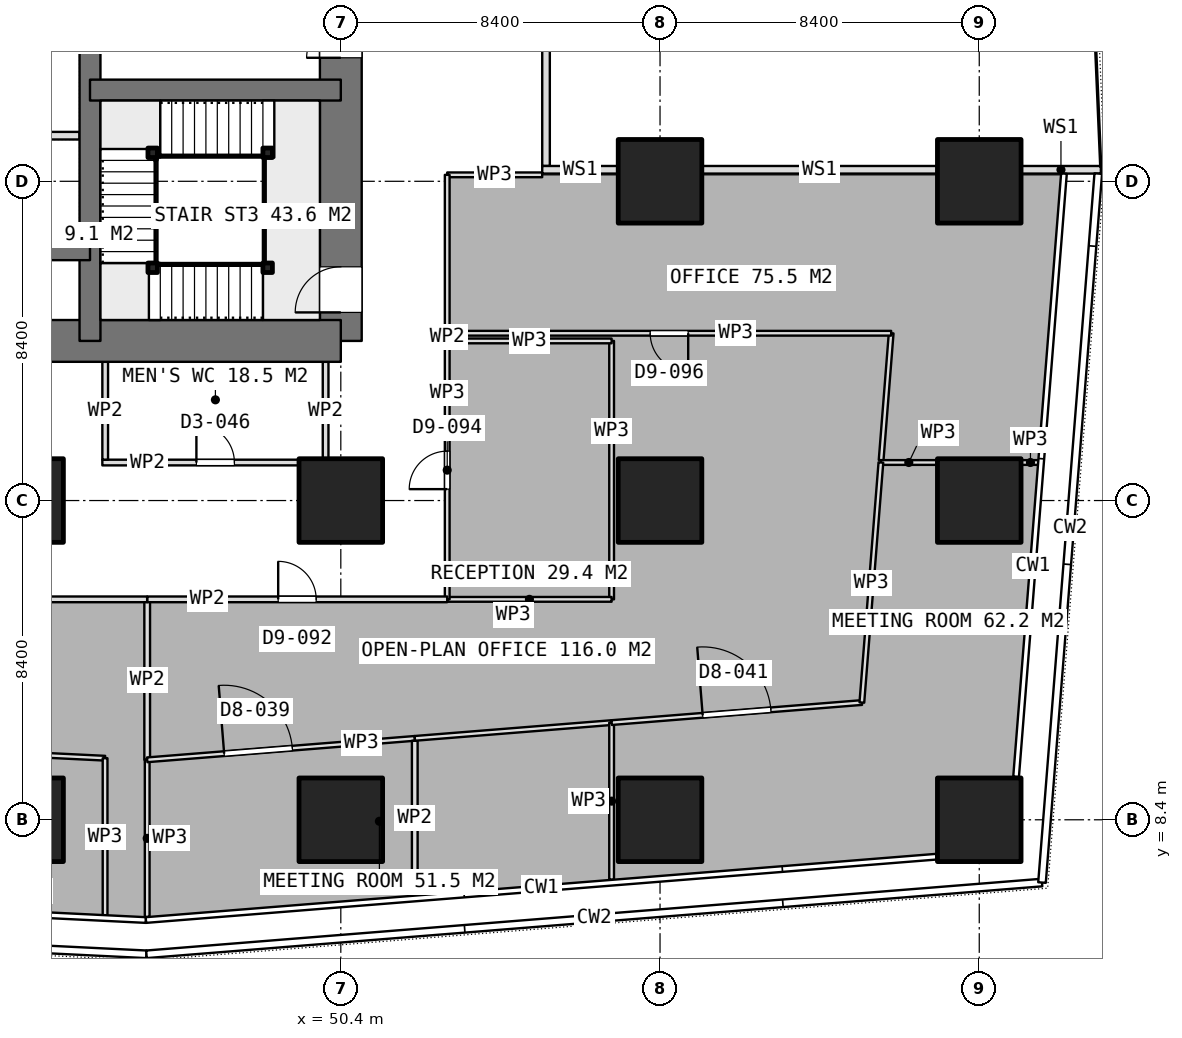
"""IFC4 building model, lengths in metres.
Left out: names, types, materials, properties, quantities, classifications, styles, units other than length and angle.
Written with IfcOpenShell. Run it as: python <this file> out.ifc"""

import sys

from ifc_helpers import new_model, si_unit, direction, frame, frame_2d, origin, origin_2d, place, context, subcontext, project, spatial, rectangle, extrude, element, fill, save


model = new_model("IFC4")
c1 = context("Model", 3, precision=1e-05, world=origin(), true_north=direction((0.0, 1.0)))
c2 = subcontext(c1, "Body", "Model", "MODEL_VIEW")
j1 = project(units=[si_unit("LENGTHUNIT", "METRE"), si_unit("PLANEANGLEUNIT", "RADIAN")], contexts=[c1])
p1 = place(None, origin())
s1 = spatial("IfcSite", under=j1, at=p1, CompositionType="ELEMENT")
p2 = place(p1, origin())
s2 = spatial("IfcBuilding", under=s1, at=p2, CompositionType="ELEMENT")
p3 = place(p2, frame((0.0, 0.0, 40.4)))
s3 = spatial("IfcBuildingStorey", under=s2, at=p3, CompositionType="ELEMENT", Elevation=40.4)
p4 = place(p3, frame((40.0, 21.0, 0.0), z_axis=(0.0, 0.0, 1.0), x_axis=(1.0, 0.0, 0.0)))
e1 = element("IfcWall", 1, at=p4, inside=s3, PredefinedType="SHEAR", context=c2, shape_type="SweptSolid", body=[
    extrude(rectangle(XDim=10.4, YDim=1.1, at=frame_2d((5.2, 0.0))), origin(), (0.0, 0.0, 1.0), 3.75),
])
p5 = place(p3, frame((50.4, 21.0, 0.0), z_axis=(0.0, 0.0, 1.0), x_axis=(0.0, 1.0, 0.0)))
e2 = element("IfcWall", 2, at=p5, inside=s3, PredefinedType="SHEAR", context=c2, shape_type="SweptSolid", body=[
    extrude(rectangle(XDim=25.2, YDim=1.1, at=frame_2d((12.6, 0.0))), origin(), (0.0, 0.0, 1.0), 3.75),
])
p6 = place(p5, frame((16.2, 0.0, 0.0)))
e3 = element("IfcOpeningElement", 3, at=p6, cuts=e2, PredefinedType="OPENING", context=c2, shape_type="SweptSolid", body=[
    extrude(rectangle(XDim=1.2, YDim=2.1, at=frame_2d((0.6, 1.05))), frame((0.0, 0.56, 0.0), z_axis=(0.0, -1.0, 0.0), x_axis=(1.0, 0.0, 0.0)), (0.0, 0.0, 1.0), 1.12),
])
p7 = place(p5, frame((10.05, 0.0, 0.0)))
e4 = element("IfcOpeningElement", 4, at=p7, cuts=e2, PredefinedType="OPENING", context=c2, shape_type="SweptSolid", body=[
    extrude(rectangle(XDim=0.9, YDim=2.1, at=frame_2d((0.45, 1.05))), frame((0.0, 0.56, 0.0), z_axis=(0.0, -1.0, 0.0), x_axis=(1.0, 0.0, 0.0)), (0.0, 0.0, 1.0), 1.12),
])
p8 = place(p5, frame((7.45, 0.0, 0.0)))
e5 = element("IfcOpeningElement", 5, at=p8, cuts=e2, PredefinedType="OPENING", context=c2, shape_type="SweptSolid", body=[
    extrude(rectangle(XDim=0.9, YDim=2.1, at=frame_2d((0.45, 1.05))), frame((0.0, 0.56, 0.0), z_axis=(0.0, -1.0, 0.0), x_axis=(1.0, 0.0, 0.0)), (0.0, 0.0, 1.0), 1.12),
])
p9 = place(p5, frame((0.75, 0.0, 0.0)))
e6 = element("IfcOpeningElement", 6, at=p9, cuts=e2, PredefinedType="OPENING", context=c2, shape_type="SweptSolid", body=[
    extrude(rectangle(XDim=1.2, YDim=2.1, at=frame_2d((0.6, 1.05))), frame((0.0, 0.56, 0.0), z_axis=(0.0, -1.0, 0.0), x_axis=(1.0, 0.0, 0.0)), (0.0, 0.0, 1.0), 1.12),
])
p10 = place(p3, frame((43.8, 21.0, 0.0), z_axis=(0.0, 0.0, 1.0), x_axis=(0.0, 1.0, 0.0)))
e7 = element("IfcWall", 7, at=p10, inside=s3, PredefinedType="SHEAR", context=c2, shape_type="SweptSolid", body=[
    extrude(rectangle(XDim=25.2, YDim=0.55, at=frame_2d((12.6, 0.0))), origin(), (0.0, 0.0, 1.0), 3.75),
])
p11 = place(p3, frame((40.0, 23.4, 0.0), z_axis=(0.0, 0.0, 1.0), x_axis=(1.0, 0.0, 0.0)))
e8 = element("IfcWall", 8, at=p11, inside=s3, PredefinedType="SHEAR", context=c2, shape_type="SweptSolid", body=[
    extrude(rectangle(XDim=3.8, YDim=0.55, at=frame_2d((1.9, 0.0))), origin(), (0.0, 0.0, 1.0), 3.75),
])
p12 = place(p3, frame((43.8, 27.6, 0.0), z_axis=(0.0, 0.0, 1.0), x_axis=(1.0, 0.0, 0.0)))
e9 = element("IfcWall", 9, at=p12, inside=s3, PredefinedType="SHEAR", context=c2, shape_type="SweptSolid", body=[
    extrude(rectangle(XDim=6.6, YDim=0.55, at=frame_2d((3.3, 0.0))), origin(), (0.0, 0.0, 1.0), 3.75),
])
for number, where, z_axis, x_axis in (
    (10, (42.0, 8.4, 0.0), (0.0, 0.0, 1.0), (1.0, 0.0, 0.0)),
    (11, (42.0, 16.8, 0.0), (0.0, 0.0, 1.0), (1.0, 0.0, 0.0)),
    (12, (50.4, 8.4, 0.0), (0.0, 0.0, 1.0), (1.0, 0.0, 0.0)),
    (13, (50.4, 16.8, 0.0), (0.0, 0.0, 1.0), (1.0, 0.0, 0.0)),
    (14, (58.8, 8.4, 0.0), (0.0, 0.0, 1.0), (1.0, 0.0, 0.0)),
    (15, (58.8, 16.8, 0.0), (0.0, 0.0, 1.0), (1.0, 0.0, 0.0)),
    (16, (58.8, 25.2, 0.0), (0.0, 0.0, 1.0), (1.0, 0.0, 0.0)),
    (17, (67.2, 8.4, 0.0), (0.0, 0.0, 1.0), (1.0, 0.0, 0.0)),
    (18, (67.2, 16.8, 0.0), (0.0, 0.0, 1.0), (1.0, 0.0, 0.0)),
    (19, (67.2, 25.2, 0.0), (0.0, 0.0, 1.0), (1.0, 0.0, 0.0)),
):
    element("IfcColumn", number, at=place(p3, frame(where, z_axis=z_axis, x_axis=x_axis)), inside=s3, PredefinedType="COLUMN", context=c2, shape_type="SweptSolid", body=[
        extrude(rectangle(XDim=2.2, YDim=2.2, at=origin_2d()), origin(), (0.0, 0.0, 1.0), 3.75),
    ])
p13 = place(p3, frame((40.275, 26.4, 0.0), z_axis=(0.0, 0.0, 1.0), x_axis=(1.0, 0.0, 0.0)))
e20 = element("IfcWall", 20, at=p13, inside=s3, PredefinedType="PARTITIONING", context=c2, shape_type="SweptSolid", body=[
    extrude(rectangle(XDim=3.25, YDim=0.2, at=frame_2d((1.625, 0.0))), origin(), (0.0, 0.0, 1.0), 3.5),
])
p14 = place(p3, frame((44.125, 17.8, 0.0), z_axis=(0.0, 0.0, 1.0), x_axis=(1.0, 0.0, 0.0)))
e21 = element("IfcWall", 21, at=p14, inside=s3, PredefinedType="PARTITIONING", context=c2, shape_type="SweptSolid", body=[
    extrude(rectangle(XDim=5.95, YDim=0.15, at=frame_2d((2.975, 0.0))), origin(), (0.0, 0.0, 1.0), 3.5),
])
p15 = place(p14, frame((2.475, 0.0, 0.0)))
e22 = element("IfcOpeningElement", 22, at=p15, cuts=e21, PredefinedType="OPENING", context=c2, shape_type="SweptSolid", body=[
    extrude(rectangle(XDim=1.0, YDim=2.1, at=frame_2d((0.5, 1.05))), frame((0.0, 0.085, 0.0), z_axis=(0.0, -1.0, 0.0), x_axis=(1.0, 0.0, 0.0)), (0.0, 0.0, 1.0), 0.17),
])
for number, where, z_axis, x_axis in (
    (23, (44.2, 17.875, 0.0), (0.0, 0.0, 1.0), (0.0, 1.0, 0.0)),
    (24, (50.0, 17.875, 0.0), (0.0, 0.0, 1.0), (0.0, 1.0, 0.0)),
):
    element("IfcWall", number, at=place(p3, frame(where, z_axis=z_axis, x_axis=x_axis)), inside=s3, PredefinedType="PARTITIONING", context=c2, shape_type="SweptSolid", body=[
        extrude(rectangle(XDim=2.575, YDim=0.15, at=frame_2d((1.288, 0.0))), origin(), (0.0, 0.0, 1.0), 3.5),
    ])
p16 = place(p3, frame((45.305, 5.845, 0.0), z_axis=(0.0, 0.0, 1.0), x_axis=(0.0, 1.0, 0.0)))
e25 = element("IfcWall", 25, at=p16, inside=s3, PredefinedType="PARTITIONING", context=c2, shape_type="SweptSolid", body=[
    extrude(rectangle(XDim=4.133, YDim=0.125, at=frame_2d((2.066, 0.0))), origin(), (0.0, 0.0, 1.0), 3.5),
])
p17 = place(p3, frame((45.305, 9.978, 0.0), z_axis=(0.0, 0.0, 1.0), x_axis=(0.996808462073, 0.079830382311, 0.0)))
e26 = element("IfcWall", 26, at=p17, inside=s3, PredefinedType="PARTITIONING", context=c2, shape_type="SweptSolid", body=[
    extrude(rectangle(XDim=7.064, YDim=0.125, at=frame_2d((3.532, 0.0))), origin(), (0.0, 0.0, 1.0), 3.5),
])
p18 = place(p17, frame((2.032, 0.0, 0.0)))
e27 = element("IfcOpeningElement", 27, at=p18, cuts=e26, PredefinedType="OPENING", context=c2, shape_type="SweptSolid", body=[
    extrude(rectangle(XDim=1.8, YDim=2.1, at=frame_2d((0.9, 1.05))), frame((0.0, 0.073, 0.0), z_axis=(0.0, -1.0, 0.0), x_axis=(1.0, 0.0, 0.0)), (0.0, 0.0, 1.0), 0.145),
])
p19 = place(p3, frame((52.347, 10.542, 0.0), z_axis=(0.0, 0.0, 1.0), x_axis=(0.996804212425, 0.079883428139, 0.0)))
e28 = element("IfcWall", 28, at=p19, inside=s3, PredefinedType="PARTITIONING", context=c2, shape_type="SweptSolid", body=[
    extrude(rectangle(XDim=5.196, YDim=0.125, at=frame_2d((2.598, 0.0))), origin(), (0.0, 0.0, 1.0), 3.5),
])
p20 = place(p3, frame((57.526, 10.957, 0.0), z_axis=(0.0, 0.0, 1.0), x_axis=(0.0, -1.0, 0.0)))
e29 = element("IfcWall", 29, at=p20, inside=s3, PredefinedType="PARTITIONING", context=c2, shape_type="SweptSolid", body=[
    extrude(rectangle(XDim=4.133, YDim=0.125, at=frame_2d((2.066, 0.0))), origin(), (0.0, 0.0, 1.0), 3.5),
])
p21 = place(p3, frame((64.612, 17.801, 0.0), z_axis=(0.0, 0.0, 1.0), x_axis=(1.0, 0.0, 0.0)))
e30 = element("IfcWall", 30, at=p21, inside=s3, PredefinedType="PARTITIONING", context=c2, shape_type="SweptSolid", body=[
    extrude(rectangle(XDim=1.468, YDim=0.125, at=frame_2d((0.734, 0.0))), origin(), (0.0, 0.0, 1.0), 3.5),
])
p22 = place(p3, frame((68.32, 17.801, 0.0), z_axis=(0.0, 0.0, 1.0), x_axis=(1.0, 0.0, 0.0)))
e31 = element("IfcWall", 31, at=p22, inside=s3, PredefinedType="PARTITIONING", context=c2, shape_type="SweptSolid", body=[
    extrude(rectangle(XDim=0.455, YDim=0.125, at=frame_2d((0.228, 0.0))), origin(), (0.0, 0.0, 1.0), 3.5),
])
p23 = place(p3, frame((57.527, 10.957, 0.0), z_axis=(0.0, 0.0, 1.0), x_axis=(0.996798921347, 0.079949424016, 0.0)))
e32 = element("IfcWall", 32, at=p23, inside=s3, PredefinedType="PARTITIONING", context=c2, shape_type="SweptSolid", body=[
    extrude(rectangle(XDim=6.605, YDim=0.125, at=frame_2d((3.303, 0.0))), origin(), (0.0, 0.0, 1.0), 3.5),
])
p24 = place(p23, frame((2.403, 0.0, 0.0)))
e33 = element("IfcOpeningElement", 33, at=p24, cuts=e32, PredefinedType="OPENING", context=c2, shape_type="SweptSolid", body=[
    extrude(rectangle(XDim=1.8, YDim=2.1, at=frame_2d((0.9, 1.05))), frame((0.0, 0.073, 0.0), z_axis=(0.0, -1.0, 0.0), x_axis=(1.0, 0.0, 0.0)), (0.0, 0.0, 1.0), 0.145),
])
p25 = place(p3, frame((64.111, 11.485, 0.0), z_axis=(0.0, 0.0, 1.0), x_axis=(0.079071322326, 0.996868961291, 0.0)))
e34 = element("IfcWall", 34, at=p25, inside=s3, PredefinedType="PARTITIONING", context=c2, shape_type="SweptSolid", body=[
    extrude(rectangle(XDim=6.336, YDim=0.125, at=frame_2d((3.168, 0.0))), origin(), (0.0, 0.0, 1.0), 3.5),
])
p26 = place(p3, frame((53.2, 21.202, 0.0), z_axis=(0.0, 0.0, 1.0), x_axis=(0.0, 1.0, 0.0)))
e35 = element("IfcWall", 35, at=p26, inside=s3, PredefinedType="PARTITIONING", context=c2, shape_type="SweptSolid", body=[
    extrude(rectangle(XDim=4.168, YDim=0.125, at=frame_2d((2.084, 0.0))), origin(), (0.0, 0.0, 1.0), 3.5),
])
p27 = place(p3, frame((53.2, 25.37, 0.0), z_axis=(0.0, 0.0, 1.0), x_axis=(1.0, 0.0, 0.0)))
e36 = element("IfcWall", 36, at=p27, inside=s3, PredefinedType="PARTITIONING", context=c2, shape_type="SweptSolid", body=[
    extrude(rectangle(XDim=2.499, YDim=0.125, at=frame_2d((1.25, 0.0))), origin(), (0.0, 0.0, 1.0), 3.5),
])
p28 = place(p3, frame((64.618, 17.863, 0.0), z_axis=(0.0, 0.0, 1.0), x_axis=(0.078870243594, 0.996884890384, 0.0)))
e37 = element("IfcWall", 37, at=p28, inside=s3, PredefinedType="PARTITIONING", context=c2, shape_type="SweptSolid", body=[
    extrude(rectangle(XDim=3.349, YDim=0.125, at=frame_2d((1.675, 0.0))), origin(), (0.0, 0.0, 1.0), 3.5),
])
p29 = place(p3, frame((64.882, 21.202, 0.0), z_axis=(0.0, 0.0, 1.0), x_axis=(-1.0, 0.0, 0.0)))
e38 = element("IfcWall", 38, at=p29, inside=s3, PredefinedType="PARTITIONING", context=c2, shape_type="SweptSolid", body=[
    extrude(rectangle(XDim=11.682, YDim=0.125, at=frame_2d((5.841, 0.0))), origin(), (0.0, 0.0, 1.0), 3.5),
])
p30 = place(p29, frame((5.341, 0.0, 0.0)))
e39 = element("IfcOpeningElement", 39, at=p30, cuts=e38, PredefinedType="OPENING", context=c2, shape_type="SweptSolid", body=[
    extrude(rectangle(XDim=1.0, YDim=2.1, at=frame_2d((0.5, 1.05))), frame((0.0, 0.073, 0.0), z_axis=(0.0, -1.0, 0.0), x_axis=(1.0, 0.0, 0.0)), (0.0, 0.0, 1.0), 0.145),
])
p31 = place(p3, frame((57.526, 21.0, 0.0), z_axis=(0.0, 0.0, 1.0), x_axis=(0.0, -1.0, 0.0)))
e40 = element("IfcWall", 40, at=p31, inside=s3, PredefinedType="PARTITIONING", context=c2, shape_type="SweptSolid", body=[
    extrude(rectangle(XDim=6.8, YDim=0.125, at=frame_2d((3.4, 0.0))), origin(), (0.0, 0.0, 1.0), 3.5),
])
p32 = place(p3, frame((57.526, 14.2, 0.0), z_axis=(0.0, 0.0, 1.0), x_axis=(-1.0, 0.0, 0.0)))
e41 = element("IfcWall", 41, at=p32, inside=s3, PredefinedType="PARTITIONING", context=c2, shape_type="SweptSolid", body=[
    extrude(rectangle(XDim=4.326, YDim=0.125, at=frame_2d((2.163, 0.0))), origin(), (0.0, 0.0, 1.0), 3.5),
])
p33 = place(p3, frame((53.2, 14.2, 0.0), z_axis=(0.0, 0.0, 1.0), x_axis=(0.0, 1.0, 0.0)))
e42 = element("IfcWall", 42, at=p33, inside=s3, PredefinedType="PARTITIONING", context=c2, shape_type="SweptSolid", body=[
    extrude(rectangle(XDim=6.8, YDim=0.125, at=frame_2d((3.4, 0.0))), origin(), (0.0, 0.0, 1.0), 3.5),
])
p34 = place(p33, frame((2.9, 0.0, 0.0)))
e43 = element("IfcOpeningElement", 43, at=p34, cuts=e42, PredefinedType="OPENING", context=c2, shape_type="SweptSolid", body=[
    extrude(rectangle(XDim=1.0, YDim=2.1, at=frame_2d((0.5, 1.05))), frame((0.0, 0.073, 0.0), z_axis=(0.0, -1.0, 0.0), x_axis=(1.0, 0.0, 0.0)), (0.0, 0.0, 1.0), 0.145),
])
p35 = place(p3, frame((53.2, 21.0, 0.0), z_axis=(0.0, 0.0, 1.0), x_axis=(1.0, 0.0, 0.0)))
e44 = element("IfcWall", 44, at=p35, inside=s3, PredefinedType="PARTITIONING", context=c2, shape_type="SweptSolid", body=[
    extrude(rectangle(XDim=4.326, YDim=0.125, at=frame_2d((2.163, 0.0))), origin(), (0.0, 0.0, 1.0), 3.5),
])
p36 = place(p3, frame((45.305, 9.978, 0.0), z_axis=(0.0, 0.0, 1.0), x_axis=(0.0, 1.0, 0.0)))
e45 = element("IfcWall", 45, at=p36, inside=s3, PredefinedType="PARTITIONING", context=c2, shape_type="SweptSolid", body=[
    extrude(rectangle(XDim=4.222, YDim=0.15, at=frame_2d((2.111, 0.0))), origin(), (0.0, 0.0, 1.0), 3.5),
])
p37 = place(p3, frame((45.305, 14.2, 0.0), z_axis=(0.0, 0.0, 1.0), x_axis=(1.0, 0.0, 0.0)))
e46 = element("IfcWall", 46, at=p37, inside=s3, PredefinedType="PARTITIONING", context=c2, shape_type="SweptSolid", body=[
    extrude(rectangle(XDim=7.895, YDim=0.15, at=frame_2d((3.948, 0.0))), origin(), (0.0, 0.0, 1.0), 3.5),
])
p38 = place(p37, frame((3.447, 0.0, 0.0)))
e47 = element("IfcOpeningElement", 47, at=p38, cuts=e46, PredefinedType="OPENING", context=c2, shape_type="SweptSolid", body=[
    extrude(rectangle(XDim=1.0, YDim=2.1, at=frame_2d((0.5, 1.05))), frame((0.0, 0.085, 0.0), z_axis=(0.0, -1.0, 0.0), x_axis=(1.0, 0.0, 0.0)), (0.0, 0.0, 1.0), 0.17),
])
p39 = place(p3, frame((53.2, 21.0, 0.0), z_axis=(0.0, 0.0, 1.0), x_axis=(0.0, 1.0, 0.0)))
e48 = element("IfcWall", 48, at=p39, inside=s3, PredefinedType="PARTITIONING", context=c2, shape_type="SweptSolid", body=[
    extrude(rectangle(XDim=0.202, YDim=0.15, at=frame_2d((0.101, 0.0))), origin(), (0.0, 0.0, 1.0), 3.5),
])
p40 = place(p3, frame((52.346, 10.479, 0.0), z_axis=(0.0, 0.0, 1.0), x_axis=(0.0, -1.0, 0.0)))
e49 = element("IfcWall", 49, at=p40, inside=s3, PredefinedType="PARTITIONING", context=c2, shape_type="SweptSolid", body=[
    extrude(rectangle(XDim=4.07, YDim=0.15, at=frame_2d((2.035, 0.0))), origin(), (0.0, 0.0, 1.0), 3.5),
])
p41 = place(p3, frame((35.2, 10.462, 0.0), z_axis=(0.0, 0.0, 1.0), x_axis=(0.998796017558, -0.049056246385, 0.0)))
e50 = element("IfcWall", 50, at=p41, inside=s3, PredefinedType="PARTITIONING", context=c2, shape_type="SweptSolid", body=[
    extrude(rectangle(XDim=9.008, YDim=0.125, at=frame_2d((4.504, 0.0))), origin(), (0.0, 0.0, 1.0), 3.5),
])
p42 = place(p41, frame((4.004, 0.0, 0.0)))
e51 = element("IfcOpeningElement", 51, at=p42, cuts=e50, PredefinedType="OPENING", context=c2, shape_type="SweptSolid", body=[
    extrude(rectangle(XDim=1.0, YDim=2.1, at=frame_2d((0.5, 1.05))), frame((0.0, 0.073, 0.0), z_axis=(0.0, -1.0, 0.0), x_axis=(1.0, 0.0, 0.0)), (0.0, 0.0, 1.0), 0.145),
])
p43 = place(p3, frame((44.197, 10.02, 0.0), z_axis=(0.0, 0.0, 1.0), x_axis=(0.0, -1.0, 0.0)))
e52 = element("IfcWall", 52, at=p43, inside=s3, PredefinedType="PARTITIONING", context=c2, shape_type="SweptSolid", body=[
    extrude(rectangle(XDim=4.155, YDim=0.125, at=frame_2d((2.078, 0.0))), origin(), (0.0, 0.0, 1.0), 3.5),
])
p44 = place(p3, frame((39.3, 14.2, 0.0), z_axis=(0.0, 0.0, 1.0), x_axis=(1.0, 0.0, 0.0)))
e53 = element("IfcWall", 53, at=p44, inside=s3, PredefinedType="PARTITIONING", context=c2, shape_type="SweptSolid", body=[
    extrude(rectangle(XDim=6.004, YDim=0.15, at=frame_2d((3.002, 0.0))), origin(), (0.0, 0.0, 1.0), 3.5),
])
for number, where, z_axis, x_axis in (
    (54, (48.475, 22.925, 0.0), (0.0, 0.0, 1.0), (1.0, 0.0, 0.0)),
    (55, (45.45, 22.925, 0.0), (0.0, 0.0, 1.0), (1.0, 0.0, 0.0)),
    (56, (45.45, 25.95, 0.0), (0.0, 0.0, 1.0), (1.0, 0.0, 0.0)),
    (57, (48.475, 25.95, 0.0), (0.0, 0.0, 1.0), (1.0, 0.0, 0.0)),
):
    element("IfcColumn", number, at=place(p3, frame(where, z_axis=z_axis, x_axis=x_axis)), inside=s3, PredefinedType="COLUMN", context=c2, shape_type="SweptSolid", body=[
        extrude(rectangle(XDim=0.25, YDim=0.25, at=origin_2d()), origin(), (0.0, 0.0, 1.0), 3.75),
    ])
p45 = place(p3, frame((55.8, 25.603, 0.0), z_axis=(0.0, 0.0, 1.0), x_axis=(0.0, 1.0, 0.0)))
e58 = element("IfcWall", 58, at=p45, inside=s3, PredefinedType="PARTITIONING", context=c2, shape_type="SweptSolid", body=[
    extrude(rectangle(XDim=26.007, YDim=0.2, at=frame_2d((13.003, 0.0))), origin(), (0.0, 0.0, 1.0), 3.5),
])
p46 = place(p45, frame((11.597, 0.0, 0.0)))
e59 = element("IfcOpeningElement", 59, at=p46, cuts=e58, PredefinedType="OPENING", context=c2, shape_type="SweptSolid", body=[
    extrude(rectangle(XDim=1.2, YDim=2.1, at=frame_2d((0.6, 1.05))), frame((0.0, 0.11, 0.0), z_axis=(0.0, -1.0, 0.0), x_axis=(1.0, 0.0, 0.0)), (0.0, 0.0, 1.0), 0.22),
])
p47 = place(p3, frame((55.7, 25.503, 0.0), z_axis=(0.0, 0.0, 1.0), x_axis=(1.0, 0.0, 0.0)))
e60 = element("IfcWall", 60, at=p47, inside=s3, PredefinedType="PARTITIONING", context=c2, shape_type="SweptSolid", body=[
    extrude(rectangle(XDim=2.0, YDim=0.2, at=frame_2d((1.0, 0.0))), origin(), (0.0, 0.0, 1.0), 3.5),
])
p48 = place(p3, frame((59.9, 25.503, 0.0), z_axis=(0.0, 0.0, 1.0), x_axis=(1.0, 0.0, 0.0)))
e61 = element("IfcWall", 61, at=p48, inside=s3, PredefinedType="PARTITIONING", context=c2, shape_type="SweptSolid", body=[
    extrude(rectangle(XDim=6.2, YDim=0.2, at=frame_2d((3.1, 0.0))), origin(), (0.0, 0.0, 1.0), 3.5),
])
p49 = place(p3, frame((68.3, 25.503, 0.0), z_axis=(0.0, 0.0, 1.0), x_axis=(1.0, 0.0, 0.0)))
e62 = element("IfcWall", 62, at=p49, inside=s3, PredefinedType="PARTITIONING", context=c2, shape_type="SweptSolid", body=[
    extrude(rectangle(XDim=2.1, YDim=0.2, at=frame_2d((1.05, 0.0))), origin(), (0.0, 0.0, 1.0), 3.5),
])
p50 = place(p8, origin())
e63 = element("IfcDoor", 63, at=p50, inside=s3, OperationType="SINGLE_SWING_LEFT", PredefinedType="DOOR", context=c2, shape_type="SweptSolid", body=[
    extrude(rectangle(XDim=0.9, YDim=2.1, at=frame_2d((0.45, 1.05))), frame((0.0, 0.025, 0.0), z_axis=(0.0, -1.0, 0.0), x_axis=(1.0, 0.0, 0.0)), (0.0, 0.0, 1.0), 0.05),
])
fill(e5, e63)
p51 = place(p15, origin())
e64 = element("IfcDoor", 64, at=p51, inside=s3, OperationType="SINGLE_SWING_LEFT", PredefinedType="DOOR", context=c2, shape_type="SweptSolid", body=[
    extrude(rectangle(XDim=1.0, YDim=2.1, at=frame_2d((0.5, 1.05))), frame((0.0, 0.025, 0.0), z_axis=(0.0, -1.0, 0.0), x_axis=(1.0, 0.0, 0.0)), (0.0, 0.0, 1.0), 0.05),
])
fill(e22, e64)
p52 = place(p18, origin())
e65 = element("IfcDoor", 65, at=p52, inside=s3, OperationType="DOUBLE_DOOR_SINGLE_SWING", PredefinedType="DOOR", context=c2, shape_type="SweptSolid", body=[
    extrude(rectangle(XDim=1.8, YDim=2.1, at=frame_2d((0.9, 1.05))), frame((0.0, 0.025, 0.0), z_axis=(0.0, -1.0, 0.0), x_axis=(1.0, 0.0, 0.0)), (0.0, 0.0, 1.0), 0.05),
])
fill(e27, e65)
p53 = place(p24, origin())
e66 = element("IfcDoor", 66, at=p53, inside=s3, OperationType="DOUBLE_DOOR_SINGLE_SWING", PredefinedType="DOOR", context=c2, shape_type="SweptSolid", body=[
    extrude(rectangle(XDim=1.8, YDim=2.1, at=frame_2d((0.9, 1.05))), frame((0.0, 0.025, 0.0), z_axis=(0.0, -1.0, 0.0), x_axis=(1.0, 0.0, 0.0)), (0.0, 0.0, 1.0), 0.05),
])
fill(e33, e66)
p54 = place(p30, origin())
e67 = element("IfcDoor", 67, at=p54, inside=s3, OperationType="SINGLE_SWING_LEFT", PredefinedType="DOOR", context=c2, shape_type="SweptSolid", body=[
    extrude(rectangle(XDim=1.0, YDim=2.1, at=frame_2d((0.5, 1.05))), frame((0.0, 0.025, 0.0), z_axis=(0.0, -1.0, 0.0), x_axis=(1.0, 0.0, 0.0)), (0.0, 0.0, 1.0), 0.05),
])
fill(e39, e67)
p55 = place(p34, origin())
e68 = element("IfcDoor", 68, at=p55, inside=s3, OperationType="SINGLE_SWING_LEFT", PredefinedType="DOOR", context=c2, shape_type="SweptSolid", body=[
    extrude(rectangle(XDim=1.0, YDim=2.1, at=frame_2d((0.5, 1.05))), frame((0.0, 0.025, 0.0), z_axis=(0.0, -1.0, 0.0), x_axis=(1.0, 0.0, 0.0)), (0.0, 0.0, 1.0), 0.05),
])
fill(e43, e68)
p56 = place(p38, origin())
e69 = element("IfcDoor", 69, at=p56, inside=s3, OperationType="SINGLE_SWING_LEFT", PredefinedType="DOOR", context=c2, shape_type="SweptSolid", body=[
    extrude(rectangle(XDim=1.0, YDim=2.1, at=frame_2d((0.5, 1.05))), frame((0.0, 0.025, 0.0), z_axis=(0.0, -1.0, 0.0), x_axis=(1.0, 0.0, 0.0)), (0.0, 0.0, 1.0), 0.05),
])
fill(e47, e69)
p57 = place(p9, origin())
e70 = element("IfcDoor", 70, at=p57, inside=s3, OperationType="SINGLE_SWING_RIGHT", PredefinedType="DOOR", context=c2, shape_type="SweptSolid", body=[
    extrude(rectangle(XDim=1.2, YDim=2.1, at=frame_2d((0.6, 1.05))), frame((0.0, 0.025, 0.0), z_axis=(0.0, -1.0, 0.0), x_axis=(1.0, 0.0, 0.0)), (0.0, 0.0, 1.0), 0.05),
])
fill(e6, e70)
save(model, sys.argv[1])
